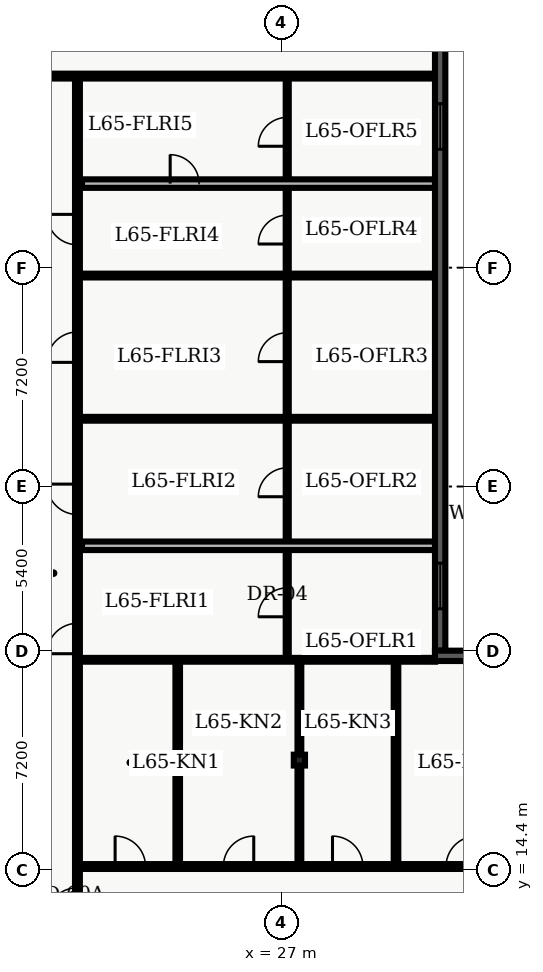
"""IFC4 building model, lengths in metres.
Left out: names, types, materials, properties, quantities, classifications, styles, units other than length and angle.
Written with IfcOpenShell. Run it as: python <this file> out.ifc"""

import sys

from ifc_helpers import new_model, entity, si_unit, converted_unit, direction, frame, origin_with_axes, origin_2d_with_axis, place, context, subcontext, project, spatial, polyline, rectangle, i_section, outline, extrude, element, fill, save


model = new_model("IFC4")
c1 = context("Model", 3, precision=1e-05, world=origin_with_axes(), true_north=direction((0.0, 1.0)))
c2 = subcontext(c1, "Body", "Model", "MODEL_VIEW")
j1 = project(units=[si_unit("LENGTHUNIT", "METRE"), converted_unit("PLANEANGLEUNIT", "DEGREE", entity("IfcPlaneAngleMeasure", 0.017), si_unit("PLANEANGLEUNIT", "RADIAN"), dimensions=[0, 0, 0, 0, 0, 0, 0])], contexts=[c1])
p1 = place(None, origin_with_axes())
s1 = spatial("IfcSite", under=j1, at=p1, CompositionType="ELEMENT")
p2 = place(p1, origin_with_axes())
s2 = spatial("IfcBuilding", under=s1, at=p2, CompositionType="ELEMENT")
p3 = place(p2, frame((0.0, 0.0, 264.6), z_axis=(0.0, 0.0, 1.0), x_axis=(1.0, 0.0, 0.0)))
s3 = spatial("IfcBuildingStorey", under=s2, at=p3, CompositionType="ELEMENT", Elevation=264.6)
p4 = place(p3, frame((27.6, 18.0, 0.0), z_axis=(0.0, 0.0, 1.0), x_axis=(1.0, 0.0, 0.0)))
e1 = element("IfcColumn", 1, at=p4, inside=s3, PredefinedType="COLUMN", context=c2, shape_type="SweptSolid", body=[
    extrude(i_section(OverallWidth=0.369, OverallDepth=0.356, WebThickness=0.011, FlangeThickness=0.018, FilletRadius=0.018, at=origin_2d_with_axis()), origin_with_axes(), (0.0, 0.0, 1.0), 3.9),
])
p5 = place(p3, frame((8.135, 40.5, 0.0), z_axis=(0.0, 0.0, 1.0), x_axis=(1.0, 0.0, 0.0)))
e2 = element("IfcWall", 2, at=p5, inside=s3, PredefinedType="PARTITIONING", context=c2, shape_type="SweptSolid", body=[
    extrude(outline(polyline([(0.0, -0.08), (23.93, -0.08), (23.93, 0.08), (0.0, 0.08), (0.0, -0.08)])), origin_with_axes(), (0.0, 0.0, 1.0), 2.7),
])
p6 = place(p5, frame((0.76, 0.0, 0.0), z_axis=(0.0, 0.0, 1.0), x_axis=(1.0, 0.0, 0.0)))
e3 = element("IfcOpeningElement", 3, at=p6, cuts=e2, PredefinedType="OPENING", context=c2, shape_type="SweptSolid", body=[
    extrude(rectangle(XDim=1.0, YDim=0.18, at=origin_2d_with_axis()), origin_with_axes(), (0.0, 0.0, 1.0), 2.15),
])
p7 = place(p5, frame((4.729, 0.0, 0.0), z_axis=(0.0, 0.0, 1.0), x_axis=(1.0, 0.0, 0.0)))
e4 = element("IfcOpeningElement", 4, at=p7, cuts=e2, PredefinedType="OPENING", context=c2, shape_type="SweptSolid", body=[
    extrude(rectangle(XDim=1.0, YDim=0.18, at=origin_2d_with_axis()), origin_with_axes(), (0.0, 0.0, 1.0), 2.15),
])
p8 = place(p5, frame((7.574, 0.0, 0.0), z_axis=(0.0, 0.0, 1.0), x_axis=(1.0, 0.0, 0.0)))
e5 = element("IfcOpeningElement", 5, at=p8, cuts=e2, PredefinedType="OPENING", context=c2, shape_type="SweptSolid", body=[
    extrude(rectangle(XDim=1.0, YDim=0.18, at=origin_2d_with_axis()), origin_with_axes(), (0.0, 0.0, 1.0), 2.15),
])
p9 = place(p5, frame((10.189, 0.0, 0.0), z_axis=(0.0, 0.0, 1.0), x_axis=(1.0, 0.0, 0.0)))
e6 = element("IfcOpeningElement", 6, at=p9, cuts=e2, PredefinedType="OPENING", context=c2, shape_type="SweptSolid", body=[
    extrude(rectangle(XDim=1.0, YDim=0.18, at=origin_2d_with_axis()), origin_with_axes(), (0.0, 0.0, 1.0), 2.15),
])
p10 = place(p3, frame((20.3, 7.8, 0.0), z_axis=(0.0, 0.0, 1.0), x_axis=(0.0, 1.0, 0.0)))
e7 = element("IfcWall", 7, at=p10, inside=s3, PredefinedType="PARTITIONING", context=c2, shape_type="SweptSolid", body=[
    extrude(outline(polyline([(0.0, -0.08), (32.7, -0.08), (32.7, 0.08), (0.0, 0.08), (0.0, -0.08)])), origin_with_axes(), (0.0, 0.0, 1.0), 2.7),
])
p11 = place(p10, frame((14.2, 0.0, 0.0), z_axis=(0.0, 0.0, 1.0), x_axis=(1.0, 0.0, 0.0)))
e8 = element("IfcOpeningElement", 8, at=p11, cuts=e7, PredefinedType="OPENING", context=c2, shape_type="SweptSolid", body=[
    extrude(rectangle(XDim=1.0, YDim=0.18, at=origin_2d_with_axis()), origin_with_axes(), (0.0, 0.0, 1.0), 2.15),
])
p12 = place(p10, frame((18.779, 0.0, 0.0), z_axis=(0.0, 0.0, 1.0), x_axis=(1.0, 0.0, 0.0)))
e9 = element("IfcOpeningElement", 9, at=p12, cuts=e7, PredefinedType="OPENING", context=c2, shape_type="SweptSolid", body=[
    extrude(rectangle(XDim=1.0, YDim=0.18, at=origin_2d_with_axis()), origin_with_axes(), (0.0, 0.0, 1.0), 2.15),
])
p13 = place(p10, frame((23.784, 0.0, 0.0), z_axis=(0.0, 0.0, 1.0), x_axis=(1.0, 0.0, 0.0)))
e10 = element("IfcOpeningElement", 10, at=p13, cuts=e7, PredefinedType="OPENING", context=c2, shape_type="SweptSolid", body=[
    extrude(rectangle(XDim=1.0, YDim=0.18, at=origin_2d_with_axis()), origin_with_axes(), (0.0, 0.0, 1.0), 2.15),
])
p14 = place(p10, frame((27.651, 0.0, 0.0), z_axis=(0.0, 0.0, 1.0), x_axis=(1.0, 0.0, 0.0)))
e11 = element("IfcOpeningElement", 11, at=p14, cuts=e7, PredefinedType="OPENING", context=c2, shape_type="SweptSolid", body=[
    extrude(rectangle(XDim=1.0, YDim=0.18, at=origin_2d_with_axis()), origin_with_axes(), (0.0, 0.0, 1.0), 2.15),
])
p15 = place(p10, frame((5.475, 0.0, 0.0), z_axis=(0.0, 0.0, 1.0), x_axis=(1.0, 0.0, 0.0)))
e12 = element("IfcOpeningElement", 12, at=p15, cuts=e7, PredefinedType="OPENING", context=c2, shape_type="SweptSolid", body=[
    extrude(rectangle(XDim=1.05, YDim=0.18, at=origin_2d_with_axis()), origin_with_axes(), (0.0, 0.0, 1.0), 2.15),
])
p16 = place(p3, frame((27.2, 21.4, 0.0), z_axis=(0.0, 0.0, 1.0), x_axis=(0.0, 1.0, 0.0)))
e13 = element("IfcWall", 13, at=p16, inside=s3, PredefinedType="PARTITIONING", context=c2, shape_type="SweptSolid", body=[
    extrude(outline(polyline([(0.0, -0.05), (18.9, -0.05), (18.9, 0.05), (0.0, 0.05), (0.0, -0.05)])), origin_with_axes(), (0.0, 0.0, 1.0), 2.7),
])
p17 = place(p16, frame((1.79, 0.0, 0.0), z_axis=(0.0, 0.0, 1.0), x_axis=(1.0, 0.0, 0.0)))
e14 = element("IfcOpeningElement", 14, at=p17, cuts=e13, PredefinedType="OPENING", context=c2, shape_type="SweptSolid", body=[
    extrude(rectangle(XDim=0.95, YDim=0.12, at=origin_2d_with_axis()), origin_with_axes(), (0.0, 0.0, 1.0), 2.15),
])
p18 = place(p16, frame((5.739, 0.0, 0.0), z_axis=(0.0, 0.0, 1.0), x_axis=(1.0, 0.0, 0.0)))
e15 = element("IfcOpeningElement", 15, at=p18, cuts=e13, PredefinedType="OPENING", context=c2, shape_type="SweptSolid", body=[
    extrude(rectangle(XDim=0.95, YDim=0.12, at=origin_2d_with_axis()), origin_with_axes(), (0.0, 0.0, 1.0), 2.15),
])
p19 = place(p16, frame((10.184, 0.0, 0.0), z_axis=(0.0, 0.0, 1.0), x_axis=(1.0, 0.0, 0.0)))
e16 = element("IfcOpeningElement", 16, at=p19, cuts=e13, PredefinedType="OPENING", context=c2, shape_type="SweptSolid", body=[
    extrude(rectangle(XDim=0.95, YDim=0.12, at=origin_2d_with_axis()), origin_with_axes(), (0.0, 0.0, 1.0), 2.15),
])
p20 = place(p16, frame((14.052, 0.0, 0.0), z_axis=(0.0, 0.0, 1.0), x_axis=(1.0, 0.0, 0.0)))
e17 = element("IfcOpeningElement", 17, at=p20, cuts=e13, PredefinedType="OPENING", context=c2, shape_type="SweptSolid", body=[
    extrude(rectangle(XDim=0.95, YDim=0.12, at=origin_2d_with_axis()), origin_with_axes(), (0.0, 0.0, 1.0), 2.15),
])
p21 = place(p16, frame((17.267, 0.0, 0.0), z_axis=(0.0, 0.0, 1.0), x_axis=(1.0, 0.0, 0.0)))
e18 = element("IfcOpeningElement", 18, at=p21, cuts=e13, PredefinedType="OPENING", context=c2, shape_type="SweptSolid", body=[
    extrude(rectangle(XDim=0.95, YDim=0.12, at=origin_2d_with_axis()), origin_with_axes(), (0.0, 0.0, 1.0), 2.15),
])
p22 = place(p3, frame((20.45, 25.05, 0.0), z_axis=(0.0, 0.0, 1.0), x_axis=(1.0, 0.0, 0.0)))
e19 = element("IfcWall", 19, at=p22, inside=s3, PredefinedType="PARTITIONING", context=c2, shape_type="SweptSolid", body=[
    extrude(outline(polyline([(0.0, -0.14), (11.615, -0.14), (11.615, 0.14), (0.0, 0.14), (0.0, -0.14)])), origin_with_axes(), (0.0, 0.0, 1.0), 2.7),
])
for number, where, z_axis, x_axis in (
    (20, (20.45, 29.228, 0.0), (0.0, 0.0, 1.0), (1.0, 0.0, 0.0)),
    (21, (20.45, 33.939, 0.0), (0.0, 0.0, 1.0), (1.0, 0.0, 0.0)),
):
    element("IfcWall", number, at=place(p3, frame(where, z_axis=z_axis, x_axis=x_axis)), inside=s3, PredefinedType="PARTITIONING", context=c2, shape_type="SweptSolid", body=[
        extrude(outline(polyline([(0.0, -0.062), (11.615, -0.062), (11.615, 0.062), (0.0, 0.062), (0.0, -0.062)])), origin_with_axes(), (0.0, 0.0, 1.0), 2.7),
    ])
p23 = place(p3, frame((20.45, 36.964, 0.0), z_axis=(0.0, 0.0, 1.0), x_axis=(1.0, 0.0, 0.0)))
e22 = element("IfcWall", 22, at=p23, inside=s3, PredefinedType="PARTITIONING", context=c2, shape_type="SweptSolid", body=[
    extrude(outline(polyline([(0.0, -0.14), (11.615, -0.14), (11.615, 0.14), (0.0, 0.14), (0.0, -0.14)])), origin_with_axes(), (0.0, 0.0, 1.0), 2.7),
])
p24 = place(p23, frame((3.375, 0.0, 0.0), z_axis=(0.0, 0.0, 1.0), x_axis=(1.0, 0.0, 0.0)))
e23 = element("IfcOpeningElement", 23, at=p24, cuts=e22, PredefinedType="OPENING", context=c2, shape_type="SweptSolid", body=[
    extrude(rectangle(XDim=0.95, YDim=0.3, at=origin_2d_with_axis()), origin_with_axes(), (0.0, 0.0, 1.0), 2.15),
])
p25 = place(p3, frame((20.3, 14.5, 0.0), z_axis=(0.0, 0.0, 1.0), x_axis=(1.0, 0.0, 0.0)))
e24 = element("IfcWall", 24, at=p25, inside=s3, PredefinedType="PARTITIONING", context=c2, shape_type="SweptSolid", body=[
    extrude(outline(polyline([(0.0, -0.08), (14.85, -0.08), (14.85, 0.08), (0.0, 0.08), (0.0, -0.08)])), origin_with_axes(), (0.0, 0.0, 1.0), 2.7),
])
p26 = place(p25, frame((1.739, 0.0, 0.0), z_axis=(0.0, 0.0, 1.0), x_axis=(1.0, 0.0, 0.0)))
e25 = element("IfcOpeningElement", 25, at=p26, cuts=e24, PredefinedType="OPENING", context=c2, shape_type="SweptSolid", body=[
    extrude(rectangle(XDim=1.0, YDim=0.18, at=origin_2d_with_axis()), origin_with_axes(), (0.0, 0.0, 1.0), 2.15),
])
p27 = place(p25, frame((5.299, 0.0, 0.0), z_axis=(0.0, 0.0, 1.0), x_axis=(1.0, 0.0, 0.0)))
e26 = element("IfcOpeningElement", 26, at=p27, cuts=e24, PredefinedType="OPENING", context=c2, shape_type="SweptSolid", body=[
    extrude(rectangle(XDim=1.0, YDim=0.18, at=origin_2d_with_axis()), origin_with_axes(), (0.0, 0.0, 1.0), 2.15),
])
p28 = place(p25, frame((8.889, 0.0, 0.0), z_axis=(0.0, 0.0, 1.0), x_axis=(1.0, 0.0, 0.0)))
e27 = element("IfcOpeningElement", 27, at=p28, cuts=e24, PredefinedType="OPENING", context=c2, shape_type="SweptSolid", body=[
    extrude(rectangle(XDim=1.0, YDim=0.18, at=origin_2d_with_axis()), origin_with_axes(), (0.0, 0.0, 1.0), 2.15),
])
p29 = place(p25, frame((12.624, 0.0, 0.0), z_axis=(0.0, 0.0, 1.0), x_axis=(1.0, 0.0, 0.0)))
e28 = element("IfcOpeningElement", 28, at=p29, cuts=e24, PredefinedType="OPENING", context=c2, shape_type="SweptSolid", body=[
    extrude(rectangle(XDim=1.0, YDim=0.18, at=origin_2d_with_axis()), origin_with_axes(), (0.0, 0.0, 1.0), 2.15),
])
p30 = place(p3, frame((23.598, 14.62, 0.0), z_axis=(0.0, 0.0, 1.0), x_axis=(0.0, 1.0, 0.0)))
e29 = element("IfcWall", 29, at=p30, inside=s3, PredefinedType="PARTITIONING", context=c2, shape_type="SweptSolid", body=[
    extrude(outline(polyline([(0.0, -0.075), (6.6, -0.075), (6.6, 0.075), (0.0, 0.075), (0.0, -0.075)])), origin_with_axes(), (0.0, 0.0, 1.0), 2.7),
])
p31 = place(p3, frame((27.6, 14.62, 0.0), z_axis=(0.0, 0.0, 1.0), x_axis=(0.0, 1.0, 0.0)))
e30 = element("IfcWall", 30, at=p31, inside=s3, PredefinedType="PARTITIONING", context=c2, shape_type="SweptSolid", body=[
    extrude(outline(polyline([(0.0, -0.062), (6.6, -0.062), (6.6, 0.062), (0.0, 0.062), (0.0, -0.062)])), origin_with_axes(), (0.0, 0.0, 1.0), 2.7),
])
p32 = place(p3, frame((30.778, 14.62, 0.0), z_axis=(0.0, 0.0, 1.0), x_axis=(0.0, 1.0, 0.0)))
e31 = element("IfcWall", 31, at=p32, inside=s3, PredefinedType="PARTITIONING", context=c2, shape_type="SweptSolid", body=[
    extrude(outline(polyline([(0.0, -0.075), (6.6, -0.075), (6.6, 0.075), (0.0, 0.075), (0.0, -0.075)])), origin_with_axes(), (0.0, 0.0, 1.0), 2.7),
])
p33 = place(p3, frame((20.3, 21.3, 0.0), z_axis=(0.0, 0.0, 1.0), x_axis=(1.0, 0.0, 0.0)))
e32 = element("IfcWall", 32, at=p33, inside=s3, PredefinedType="PARTITIONING", context=c2, shape_type="SweptSolid", body=[
    extrude(outline(polyline([(0.0, -0.062), (11.765, -0.062), (11.765, 0.062), (0.0, 0.062), (0.0, -0.062)])), origin_with_axes(), (0.0, 0.0, 1.0), 2.7),
])
p34 = place(p3, frame((32.23, 41.82, 0.0), z_axis=(0.0, 0.0, 1.0), x_axis=(0.0, -1.0, 0.0)))
e33 = element("IfcWall", 33, at=p34, inside=s3, PredefinedType="SOLIDWALL", context=c2, shape_type="SweptSolid", body=[
    extrude(outline(polyline([(0.0, -0.17), (20.22, -0.17), (20.22, 0.17), (0.0, 0.17), (0.0, -0.17)])), origin_with_axes(), (0.0, 0.0, 1.0), 3.66),
])
p35 = place(p34, frame((2.978, 0.0, 0.45), z_axis=(0.0, 0.0, 1.0), x_axis=(1.0, 0.0, 0.0)))
e34 = element("IfcOpeningElement", 34, at=p35, cuts=e33, PredefinedType="OPENING", context=c2, shape_type="SweptSolid", body=[
    extrude(rectangle(XDim=1.5, YDim=0.36, at=origin_2d_with_axis()), origin_with_axes(), (0.0, 0.0, 1.0), 2.1),
])
p36 = place(p34, frame((18.092, 0.0, 0.45), z_axis=(0.0, 0.0, 1.0), x_axis=(1.0, 0.0, 0.0)))
e35 = element("IfcOpeningElement", 35, at=p36, cuts=e33, PredefinedType="OPENING", context=c2, shape_type="SweptSolid", body=[
    extrude(rectangle(XDim=1.5, YDim=0.36, at=origin_2d_with_axis()), origin_with_axes(), (0.0, 0.0, 1.0), 2.1),
])
p37 = place(p3, frame((32.06, 21.43, 0.0), z_axis=(0.0, 0.0, 1.0), x_axis=(1.0, 0.0, 0.0)))
e36 = element("IfcWall", 36, at=p37, inside=s3, PredefinedType="SOLIDWALL", context=c2, shape_type="SweptSolid", body=[
    extrude(outline(polyline([(0.0, -0.17), (2.14, -0.17), (2.14, 0.17), (0.0, 0.17), (0.0, -0.17)])), origin_with_axes(), (0.0, 0.0, 1.0), 3.66),
])
p38 = place(p16, frame((1.79, 0.0, 0.0), z_axis=(0.0, 0.0, 1.0), x_axis=(1.0, 0.0, 0.0)))
e37 = element("IfcDoor", 37, at=p38, inside=s3, OperationType="SINGLE_SWING_LEFT", PredefinedType="DOOR", context=c2, shape_type="SweptSolid", body=[
    extrude(rectangle(XDim=0.95, YDim=0.06, at=origin_2d_with_axis()), origin_with_axes(), (0.0, 0.0, 1.0), 2.15),
])
fill(e14, e37)
p39 = place(p10, frame((14.2, 0.0, 0.0), z_axis=(0.0, 0.0, 1.0), x_axis=(1.0, 0.0, 0.0)))
e38 = element("IfcDoor", 38, at=p39, inside=s3, OperationType="SINGLE_SWING_LEFT", PredefinedType="DOOR", context=c2, shape_type="SweptSolid", body=[
    extrude(rectangle(XDim=1.0, YDim=0.09, at=origin_2d_with_axis()), origin_with_axes(), (0.0, 0.0, 1.0), 2.15),
])
fill(e8, e38)
p40 = place(p16, frame((5.739, 0.0, 0.0), z_axis=(0.0, 0.0, 1.0), x_axis=(1.0, 0.0, 0.0)))
e39 = element("IfcDoor", 39, at=p40, inside=s3, OperationType="SINGLE_SWING_LEFT", PredefinedType="DOOR", context=c2, shape_type="SweptSolid", body=[
    extrude(rectangle(XDim=0.95, YDim=0.06, at=origin_2d_with_axis()), origin_with_axes(), (0.0, 0.0, 1.0), 2.15),
])
fill(e15, e39)
p41 = place(p10, frame((18.779, 0.0, 0.0), z_axis=(0.0, 0.0, 1.0), x_axis=(1.0, 0.0, 0.0)))
e40 = element("IfcDoor", 40, at=p41, inside=s3, OperationType="SINGLE_SWING_RIGHT", PredefinedType="DOOR", context=c2, shape_type="SweptSolid", body=[
    extrude(rectangle(XDim=1.0, YDim=0.09, at=origin_2d_with_axis()), origin_with_axes(), (0.0, 0.0, 1.0), 2.15),
])
fill(e9, e40)
p42 = place(p16, frame((10.184, 0.0, 0.0), z_axis=(0.0, 0.0, 1.0), x_axis=(1.0, 0.0, 0.0)))
e41 = element("IfcDoor", 41, at=p42, inside=s3, OperationType="SINGLE_SWING_LEFT", PredefinedType="DOOR", context=c2, shape_type="SweptSolid", body=[
    extrude(rectangle(XDim=0.95, YDim=0.06, at=origin_2d_with_axis()), origin_with_axes(), (0.0, 0.0, 1.0), 2.15),
])
fill(e16, e41)
p43 = place(p10, frame((23.784, 0.0, 0.0), z_axis=(0.0, 0.0, 1.0), x_axis=(1.0, 0.0, 0.0)))
e42 = element("IfcDoor", 42, at=p43, inside=s3, OperationType="SINGLE_SWING_LEFT", PredefinedType="DOOR", context=c2, shape_type="SweptSolid", body=[
    extrude(rectangle(XDim=1.0, YDim=0.09, at=origin_2d_with_axis()), origin_with_axes(), (0.0, 0.0, 1.0), 2.15),
])
fill(e10, e42)
p44 = place(p16, frame((14.052, 0.0, 0.0), z_axis=(0.0, 0.0, 1.0), x_axis=(1.0, 0.0, 0.0)))
e43 = element("IfcDoor", 43, at=p44, inside=s3, OperationType="SINGLE_SWING_LEFT", PredefinedType="DOOR", context=c2, shape_type="SweptSolid", body=[
    extrude(rectangle(XDim=0.95, YDim=0.06, at=origin_2d_with_axis()), origin_with_axes(), (0.0, 0.0, 1.0), 2.15),
])
fill(e17, e43)
p45 = place(p10, frame((27.651, 0.0, 0.0), z_axis=(0.0, 0.0, 1.0), x_axis=(1.0, 0.0, 0.0)))
e44 = element("IfcDoor", 44, at=p45, inside=s3, OperationType="SINGLE_SWING_RIGHT", PredefinedType="DOOR", context=c2, shape_type="SweptSolid", body=[
    extrude(rectangle(XDim=1.0, YDim=0.09, at=origin_2d_with_axis()), origin_with_axes(), (0.0, 0.0, 1.0), 2.15),
])
fill(e11, e44)
p46 = place(p16, frame((17.267, 0.0, 0.0), z_axis=(0.0, 0.0, 1.0), x_axis=(1.0, 0.0, 0.0)))
e45 = element("IfcDoor", 45, at=p46, inside=s3, OperationType="SINGLE_SWING_LEFT", PredefinedType="DOOR", context=c2, shape_type="SweptSolid", body=[
    extrude(rectangle(XDim=0.95, YDim=0.06, at=origin_2d_with_axis()), origin_with_axes(), (0.0, 0.0, 1.0), 2.15),
])
fill(e18, e45)
p47 = place(p23, frame((3.375, 0.0, 0.0), z_axis=(0.0, 0.0, 1.0), x_axis=(1.0, 0.0, 0.0)))
e46 = element("IfcDoor", 46, at=p47, inside=s3, OperationType="SINGLE_SWING_LEFT", PredefinedType="DOOR", context=c2, shape_type="SweptSolid", body=[
    extrude(rectangle(XDim=0.95, YDim=0.09, at=origin_2d_with_axis()), origin_with_axes(), (0.0, 0.0, 1.0), 2.15),
])
fill(e23, e46)
p48 = place(p10, frame((5.475, 0.0, 0.0), z_axis=(0.0, 0.0, 1.0), x_axis=(1.0, 0.0, 0.0)))
e47 = element("IfcDoor", 47, at=p48, inside=s3, OperationType="SINGLE_SWING_LEFT", PredefinedType="DOOR", context=c2, shape_type="SweptSolid", body=[
    extrude(rectangle(XDim=1.05, YDim=0.09, at=origin_2d_with_axis()), origin_with_axes(), (0.0, 0.0, 1.0), 2.15),
])
fill(e12, e47)
p49 = place(p25, frame((1.739, 0.0, 0.0), z_axis=(0.0, 0.0, 1.0), x_axis=(1.0, 0.0, 0.0)))
e48 = element("IfcDoor", 48, at=p49, inside=s3, OperationType="SINGLE_SWING_LEFT", PredefinedType="DOOR", context=c2, shape_type="SweptSolid", body=[
    extrude(rectangle(XDim=1.0, YDim=0.09, at=origin_2d_with_axis()), origin_with_axes(), (0.0, 0.0, 1.0), 2.15),
])
fill(e25, e48)
p50 = place(p25, frame((5.299, 0.0, 0.0), z_axis=(0.0, 0.0, 1.0), x_axis=(1.0, 0.0, 0.0)))
e49 = element("IfcDoor", 49, at=p50, inside=s3, OperationType="SINGLE_SWING_RIGHT", PredefinedType="DOOR", context=c2, shape_type="SweptSolid", body=[
    extrude(rectangle(XDim=1.0, YDim=0.09, at=origin_2d_with_axis()), origin_with_axes(), (0.0, 0.0, 1.0), 2.15),
])
fill(e26, e49)
p51 = place(p25, frame((8.889, 0.0, 0.0), z_axis=(0.0, 0.0, 1.0), x_axis=(1.0, 0.0, 0.0)))
e50 = element("IfcDoor", 50, at=p51, inside=s3, OperationType="SINGLE_SWING_LEFT", PredefinedType="DOOR", context=c2, shape_type="SweptSolid", body=[
    extrude(rectangle(XDim=1.0, YDim=0.09, at=origin_2d_with_axis()), origin_with_axes(), (0.0, 0.0, 1.0), 2.15),
])
fill(e27, e50)
p52 = place(p25, frame((12.624, 0.0, 0.0), z_axis=(0.0, 0.0, 1.0), x_axis=(1.0, 0.0, 0.0)))
e51 = element("IfcDoor", 51, at=p52, inside=s3, OperationType="SINGLE_SWING_RIGHT", PredefinedType="DOOR", context=c2, shape_type="SweptSolid", body=[
    extrude(rectangle(XDim=1.0, YDim=0.09, at=origin_2d_with_axis()), origin_with_axes(), (0.0, 0.0, 1.0), 2.15),
])
fill(e28, e51)
p53 = place(p34, frame((2.978, 0.0, 0.45), z_axis=(0.0, 0.0, 1.0), x_axis=(1.0, 0.0, 0.0)))
e52 = element("IfcWindow", 52, at=p53, inside=s3, PredefinedType="WINDOW", context=c2, shape_type="SweptSolid", body=[
    extrude(rectangle(XDim=1.5, YDim=0.09, at=origin_2d_with_axis()), origin_with_axes(), (0.0, 0.0, 1.0), 2.1),
])
fill(e34, e52)
p54 = place(p34, frame((18.092, 0.0, 0.45), z_axis=(0.0, 0.0, 1.0), x_axis=(1.0, 0.0, 0.0)))
e53 = element("IfcWindow", 53, at=p54, inside=s3, PredefinedType="WINDOW", context=c2, shape_type="SweptSolid", body=[
    extrude(rectangle(XDim=1.5, YDim=0.09, at=origin_2d_with_axis()), origin_with_axes(), (0.0, 0.0, 1.0), 2.1),
])
fill(e35, e53)
save(model, sys.argv[1])
